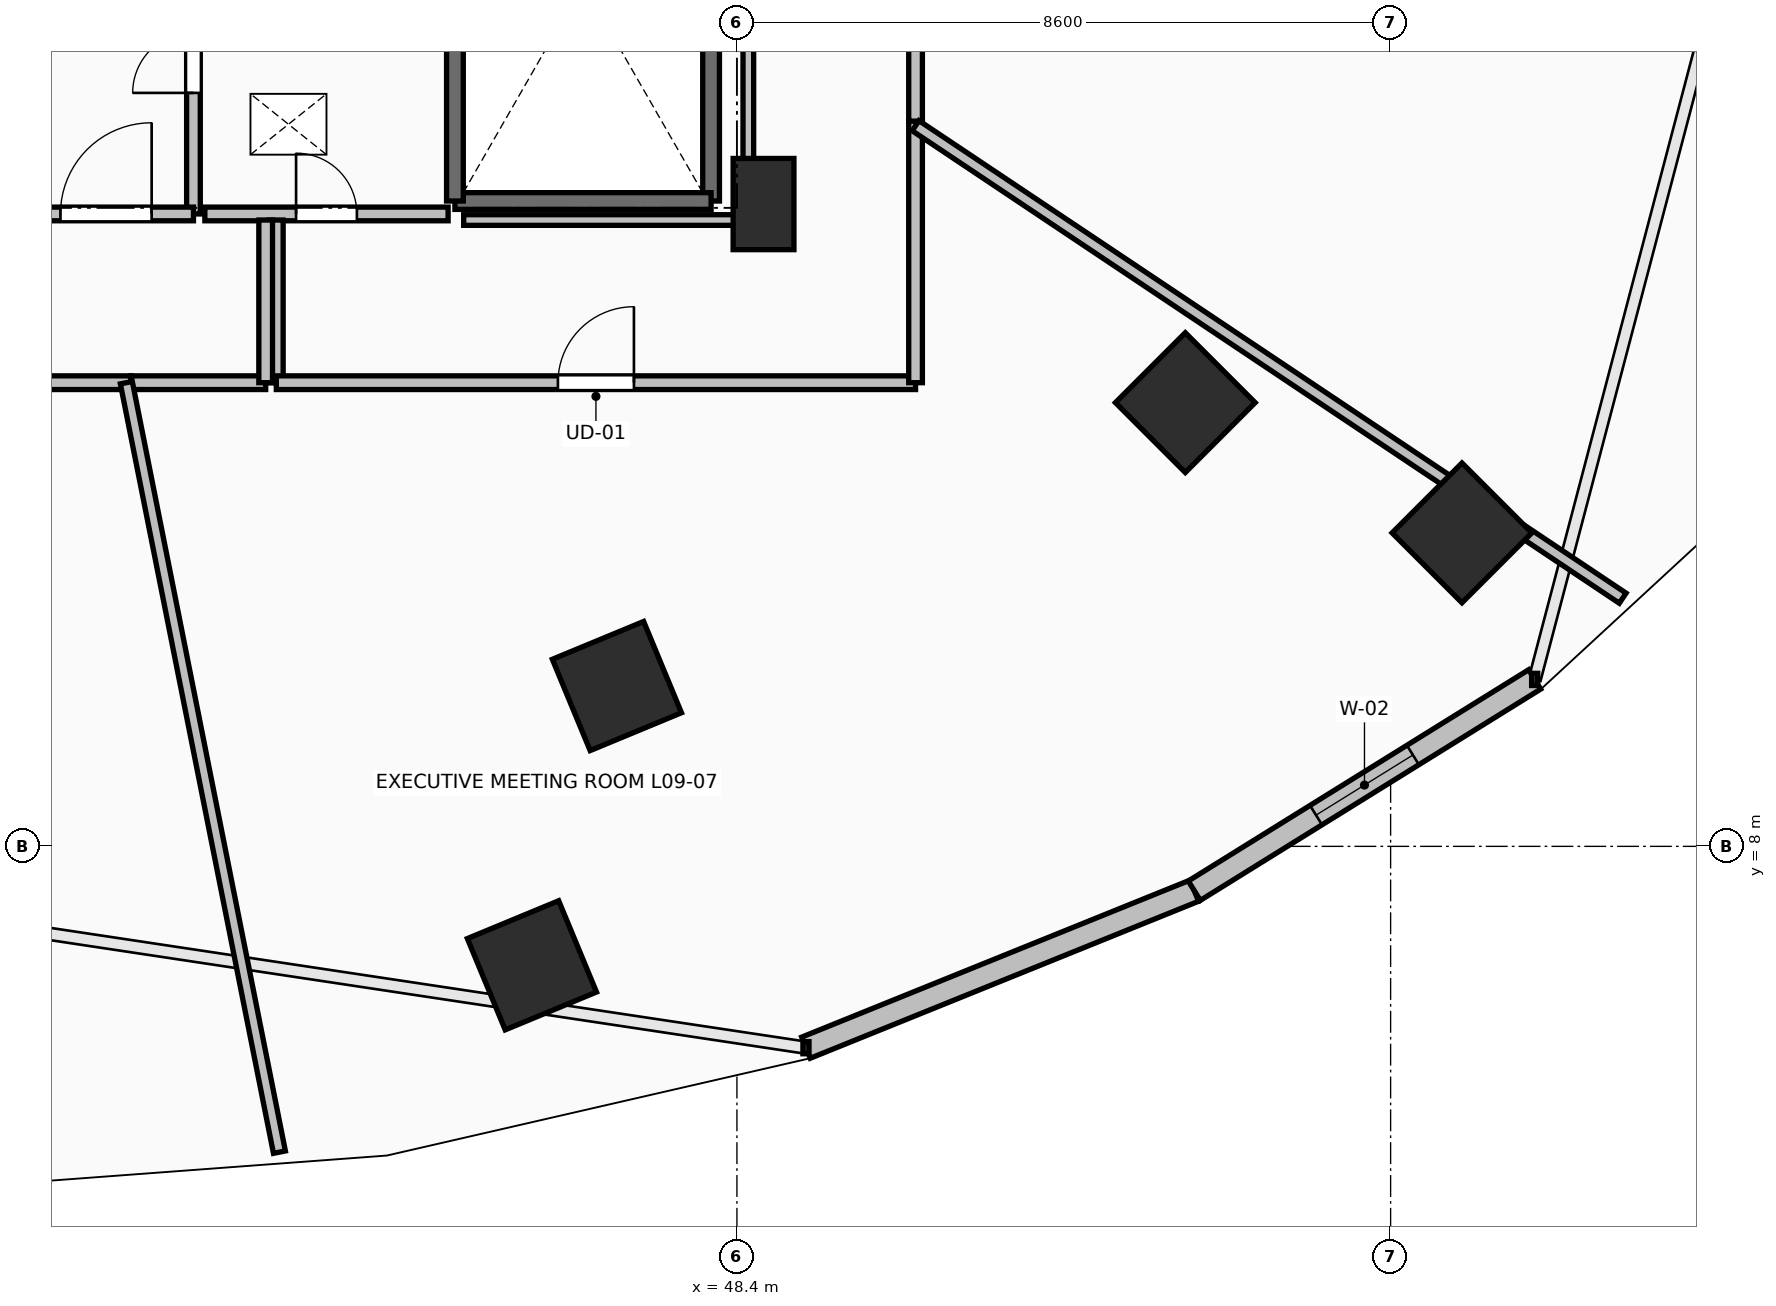
"""IFC4 building model, lengths in metres.
Left out: names, types, materials, properties, quantities, classifications, styles, units other than length and angle.
Written with IfcOpenShell. Run it as: python <this file> out.ifc"""

import sys

from ifc_helpers import new_model, si_unit, direction, frame, frame_2d, origin, origin_2d, place, context, subcontext, project, spatial, rectangle, extrude, element, fill, save


model = new_model("IFC4")
c1 = context("Model", 3, precision=1e-05, world=origin(), true_north=direction((0.0, 1.0)))
c2 = subcontext(c1, "Body", "Model", "MODEL_VIEW")
j1 = project(units=[si_unit("LENGTHUNIT", "METRE"), si_unit("PLANEANGLEUNIT", "RADIAN")], contexts=[c1])
p1 = place(None, origin())
s1 = spatial("IfcSite", under=j1, at=p1, CompositionType="ELEMENT")
p2 = place(p1, origin())
s2 = spatial("IfcBuilding", under=s1, at=p2, CompositionType="ELEMENT")
p3 = place(p2, frame((0.0, 0.0, 38.0)))
s3 = spatial("IfcBuildingStorey", under=s2, at=p3, CompositionType="ELEMENT", Elevation=38.0)
for number, where, z_axis, x_axis in (
    (1, (46.821, 10.109, 0.0), (0.0, 0.0, 1.0), (0.383, -0.924, 0.0)),
    (2, (54.299, 13.838, 0.0), (0.0, 0.0, 1.0), (0.707, -0.707, 0.0)),
    (3, (45.703, 6.435, 0.0), (0.0, 0.0, 1.0), (0.383, -0.924, 0.0)),
    (4, (57.939, 12.124, 0.0), (0.0, 0.0, 1.0), (0.707, -0.707, 0.0)),
):
    element("IfcColumn", number, at=place(p3, frame(where, z_axis=z_axis, x_axis=x_axis)), inside=s3, PredefinedType="COLUMN", context=c2, shape_type="SweptSolid", body=[
        extrude(rectangle(XDim=1.3, YDim=1.3, at=origin_2d()), origin(), (0.0, 0.0, 1.0), 3.5),
    ])
p4 = place(p3, frame((48.75, 16.45, 0.0), z_axis=(0.0, 0.0, 1.0), x_axis=(1.0, 0.0, 0.0)))
e5 = element("IfcColumn", 5, at=p4, inside=s3, PredefinedType="PILASTER", context=c2, shape_type="SweptSolid", body=[
    extrude(rectangle(XDim=0.8, YDim=1.2, at=origin_2d()), origin(), (0.0, 0.0, 1.0), 3.5),
])
p5 = place(p3, frame((49.308, 5.351, 0.0), z_axis=(0.0, 0.0, 1.0), x_axis=(0.927095325176, 0.374825636845, 0.0)))
e6 = element("IfcWall", 6, at=p5, inside=s3, PredefinedType="STANDARD", context=c2, shape_type="SweptSolid", body=[
    extrude(rectangle(XDim=5.51, YDim=0.3, at=frame_2d((2.755, 0.0))), origin(), (0.0, 0.0, 1.0), 3.24),
])
p6 = place(p3, frame((54.417, 7.417, 0.0), z_axis=(0.0, 0.0, 1.0), x_axis=(0.849633724826, 0.527373239404, 0.0)))
e7 = element("IfcWall", 7, at=p6, inside=s3, PredefinedType="STANDARD", context=c2, shape_type="SweptSolid", body=[
    extrude(rectangle(XDim=5.271, YDim=0.3, at=frame_2d((2.635, 0.0))), origin(), (0.0, 0.0, 1.0), 3.24),
])
p7 = place(p6, frame((1.885, 0.0, 0.85)))
e8 = element("IfcOpeningElement", 8, at=p7, cuts=e7, PredefinedType="OPENING", context=c2, shape_type="SweptSolid", body=[
    extrude(rectangle(XDim=1.5, YDim=2.19, at=frame_2d((0.75, 1.095))), frame((0.0, 0.165, 0.0), z_axis=(0.0, -1.0, 0.0), x_axis=(1.0, 0.0, 0.0)), (0.0, 0.0, 1.0), 0.33),
])
p8 = place(p3, frame((48.06, 23.91, 0.0), z_axis=(0.0, 0.0, 1.0), x_axis=(0.0, -1.0, 0.0)))
e9 = element("IfcWall", 9, at=p8, inside=s3, PredefinedType="SOLIDWALL", context=c2, shape_type="SweptSolid", body=[
    extrude(rectangle(XDim=7.42, YDim=0.22, at=frame_2d((3.71, 0.0))), origin(), (0.0, 0.0, 1.0), 3.24),
])
p9 = place(p3, frame((48.06, 16.49, 0.0), z_axis=(0.0, 0.0, 1.0), x_axis=(-1.0, 0.0, 0.0)))
e10 = element("IfcWall", 10, at=p9, inside=s3, PredefinedType="SOLIDWALL", context=c2, shape_type="SweptSolid", body=[
    extrude(rectangle(XDim=3.37, YDim=0.22, at=frame_2d((1.685, 0.0))), origin(), (0.0, 0.0, 1.0), 3.24),
])
p10 = place(p3, frame((44.69, 16.49, 0.0), z_axis=(0.0, 0.0, 1.0), x_axis=(0.0, 1.0, 0.0)))
e11 = element("IfcWall", 11, at=p10, inside=s3, PredefinedType="SOLIDWALL", context=c2, shape_type="SweptSolid", body=[
    extrude(rectangle(XDim=7.42, YDim=0.22, at=frame_2d((3.71, 0.0))), origin(), (0.0, 0.0, 1.0), 3.24),
])
p11 = place(p3, frame((41.25, 16.32, 0.0), z_axis=(0.0, 0.0, 1.0), x_axis=(0.0, 1.0, 0.0)))
e12 = element("IfcWall", 12, at=p11, inside=s3, PredefinedType="PARTITIONING", context=c2, shape_type="SweptSolid", body=[
    extrude(rectangle(XDim=3.985, YDim=0.18, at=frame_2d((1.992, 0.0))), origin(), (0.0, 0.0, 1.0), 3.24),
])
p12 = place(p11, frame((1.593, 0.0, 0.0)))
e13 = element("IfcOpeningElement", 13, at=p12, cuts=e12, PredefinedType="OPENING", context=c2, shape_type="SweptSolid", body=[
    extrude(rectangle(XDim=0.8, YDim=2.05, at=frame_2d((0.4, 1.025))), frame((0.0, 0.105, 0.0), z_axis=(0.0, -1.0, 0.0), x_axis=(1.0, 0.0, 0.0)), (0.0, 0.0, 1.0), 0.21),
])
p13 = place(p3, frame((38.95, 16.32, 0.0), z_axis=(0.0, 0.0, 1.0), x_axis=(1.0, 0.0, 0.0)))
e14 = element("IfcWall", 14, at=p13, inside=s3, PredefinedType="PARTITIONING", context=c2, shape_type="SweptSolid", body=[
    extrude(rectangle(XDim=2.3, YDim=0.18, at=frame_2d((1.15, 0.0))), origin(), (0.0, 0.0, 1.0), 3.24),
])
p14 = place(p13, frame((0.55, 0.0, 0.0)))
e15 = element("IfcOpeningElement", 15, at=p14, cuts=e14, PredefinedType="OPENING", context=c2, shape_type="SweptSolid", body=[
    extrude(rectangle(XDim=1.2, YDim=2.15, at=frame_2d((0.6, 1.075))), frame((0.0, 0.105, 0.0), z_axis=(0.0, -1.0, 0.0), x_axis=(1.0, 0.0, 0.0)), (0.0, 0.0, 1.0), 0.21),
])
p15 = place(p3, frame((41.4, 16.32, 0.0), z_axis=(0.0, 0.0, 1.0), x_axis=(1.0, 0.0, 0.0)))
e16 = element("IfcWall", 16, at=p15, inside=s3, PredefinedType="PARTITIONING", context=c2, shape_type="SweptSolid", body=[
    extrude(rectangle(XDim=3.2, YDim=0.18, at=frame_2d((1.6, 0.0))), origin(), (0.0, 0.0, 1.0), 3.24),
])
p16 = place(p15, frame((1.2, 0.0, 0.0)))
e17 = element("IfcOpeningElement", 17, at=p16, cuts=e16, PredefinedType="OPENING", context=c2, shape_type="SweptSolid", body=[
    extrude(rectangle(XDim=0.8, YDim=2.05, at=frame_2d((0.4, 1.025))), frame((0.0, 0.105, 0.0), z_axis=(0.0, -1.0, 0.0), x_axis=(1.0, 0.0, 0.0)), (0.0, 0.0, 1.0), 0.21),
])
p17 = place(p3, frame((30.109, 14.1, 0.0), z_axis=(0.0, 0.0, 1.0), x_axis=(1.0, 0.0, 0.0)))
e18 = element("IfcWall", 18, at=p17, inside=s3, PredefinedType="PARTITIONING", context=c2, shape_type="SweptSolid", body=[
    extrude(rectangle(XDim=10.319, YDim=0.18, at=frame_2d((5.16, 0.0))), origin(), (0.0, 0.0, 1.0), 3.24),
])
p18 = place(p17, frame((4.659, 0.0, 0.0)))
e19 = element("IfcOpeningElement", 19, at=p18, cuts=e18, PredefinedType="OPENING", context=c2, shape_type="SweptSolid", body=[
    extrude(rectangle(XDim=1.0, YDim=2.15, at=frame_2d((0.5, 1.075))), frame((0.0, 0.105, 0.0), z_axis=(0.0, -1.0, 0.0), x_axis=(1.0, 0.0, 0.0)), (0.0, 0.0, 1.0), 0.21),
])
p19 = place(p3, frame((42.34, 16.24, 0.0), z_axis=(0.0, 0.0, 1.0), x_axis=(0.0, -1.0, 0.0)))
e20 = element("IfcWall", 20, at=p19, inside=s3, PredefinedType="PARTITIONING", context=c2, shape_type="SweptSolid", body=[
    extrude(rectangle(XDim=2.14, YDim=0.18, at=frame_2d((1.07, 0.0))), origin(), (0.0, 0.0, 1.0), 3.24),
])
p20 = place(p3, frame((42.34, 14.1, 0.0), z_axis=(0.0, 0.0, 1.0), x_axis=(1.0, 0.0, 0.0)))
e21 = element("IfcWall", 21, at=p20, inside=s3, PredefinedType="PARTITIONING", context=c2, shape_type="SweptSolid", body=[
    extrude(rectangle(XDim=8.41, YDim=0.18, at=frame_2d((4.205, 0.0))), origin(), (0.0, 0.0, 1.0), 2.432),
])
p21 = place(p20, frame((3.705, 0.0, 0.0)))
e22 = element("IfcOpeningElement", 22, at=p21, cuts=e21, PredefinedType="OPENING", context=c2, shape_type="SweptSolid", body=[
    extrude(rectangle(XDim=1.0, YDim=2.15, at=frame_2d((0.5, 1.075))), frame((0.0, 0.105, 0.0), z_axis=(0.0, -1.0, 0.0), x_axis=(1.0, 0.0, 0.0)), (0.0, 0.0, 1.0), 0.21),
])
p22 = place(p3, frame((50.75, 14.1, 0.0), z_axis=(0.0, 0.0, 1.0), x_axis=(0.0, 1.0, 0.0)))
e23 = element("IfcWall", 23, at=p22, inside=s3, PredefinedType="PARTITIONING", context=c2, shape_type="SweptSolid", body=[
    extrude(rectangle(XDim=3.441, YDim=0.18, at=frame_2d((1.72, 0.0))), origin(), (0.0, 0.0, 1.0), 2.432),
])
p23 = place(p3, frame((40.428, 14.1, 0.0), z_axis=(0.0, 0.0, 1.0), x_axis=(1.0, 0.0, 0.0)))
e24 = element("IfcWall", 24, at=p23, inside=s3, PredefinedType="PARTITIONING", context=c2, shape_type="SweptSolid", body=[
    extrude(rectangle(XDim=1.772, YDim=0.18, at=frame_2d((0.886, 0.0))), origin(), (0.0, 0.0, 1.0), 3.24),
])
p24 = place(p3, frame((42.2, 14.1, 0.0), z_axis=(0.0, 0.0, 1.0), x_axis=(0.0, 1.0, 0.0)))
e25 = element("IfcWall", 25, at=p24, inside=s3, PredefinedType="PARTITIONING", context=c2, shape_type="SweptSolid", body=[
    extrude(rectangle(XDim=2.14, YDim=0.18, at=frame_2d((1.07, 0.0))), origin(), (0.0, 0.0, 1.0), 3.24),
])
p25 = place(p3, frame((50.75, 17.541, 0.0), z_axis=(0.0, 0.0, 1.0), x_axis=(0.0, 1.0, 0.0)))
e26 = element("IfcWall", 26, at=p25, inside=s3, PredefinedType="PARTITIONING", context=c2, shape_type="SweptSolid", body=[
    extrude(rectangle(XDim=10.795, YDim=0.18, at=frame_2d((5.397, 0.0))), origin(), (0.0, 0.0, 1.0), 2.432),
])
p26 = place(p25, frame((4.897, 0.0, 0.0)))
e27 = element("IfcOpeningElement", 27, at=p26, cuts=e26, PredefinedType="OPENING", context=c2, shape_type="SweptSolid", body=[
    extrude(rectangle(XDim=1.0, YDim=2.15, at=frame_2d((0.5, 1.075))), frame((0.0, 0.105, 0.0), z_axis=(0.0, -1.0, 0.0), x_axis=(1.0, 0.0, 0.0)), (0.0, 0.0, 1.0), 0.21),
])
p27 = place(p3, frame((42.381, 3.977, 0.0), z_axis=(0.0, 0.0, 1.0), x_axis=(-0.195142599893, 0.980774880239, 0.0)))
e28 = element("IfcWall", 28, at=p27, inside=s3, PredefinedType="PARTITIONING", context=c2, shape_type="SweptSolid", body=[
    extrude(rectangle(XDim=10.322, YDim=0.16, at=frame_2d((5.161, 0.0))), origin(), (0.0, 0.0, 1.0), 2.432),
])
p28 = place(p3, frame((60.053, 11.265, 0.0), z_axis=(0.0, 0.0, 1.0), x_axis=(-0.831469078055, 0.555571032577, 0.0)))
e29 = element("IfcWall", 29, at=p28, inside=s3, PredefinedType="PARTITIONING", context=c2, shape_type="SweptSolid", body=[
    extrude(rectangle(XDim=11.189, YDim=0.16, at=frame_2d((5.594, 0.0))), origin(), (0.0, 0.0, 1.0), 2.624),
])
p29 = place(p3, frame((48.55, 23.754, 0.0), z_axis=(0.0, 0.0, 1.0), x_axis=(0.0, -1.0, 0.0)))
e30 = element("IfcWall", 30, at=p29, inside=s3, PredefinedType="PARTITIONING", context=c2, shape_type="SweptSolid", body=[
    extrude(rectangle(XDim=7.514, YDim=0.14, at=frame_2d((3.757, 0.0))), origin(), (0.0, 0.0, 1.0), 2.432),
])
p30 = place(p3, frame((48.55, 16.24, 0.0), z_axis=(0.0, 0.0, 1.0), x_axis=(-1.0, 0.0, 0.0)))
e31 = element("IfcWall", 31, at=p30, inside=s3, PredefinedType="PARTITIONING", context=c2, shape_type="SweptSolid", body=[
    extrude(rectangle(XDim=3.745, YDim=0.14, at=frame_2d((1.873, 0.0))), origin(), (0.0, 0.0, 1.0), 2.432),
])
p31 = place(p7, origin())
e32 = element("IfcWindow", 32, at=p31, inside=s3, PartitioningType="SINGLE_PANEL", PredefinedType="WINDOW", context=c2, shape_type="SweptSolid", body=[
    extrude(rectangle(XDim=1.5, YDim=2.19, at=frame_2d((0.75, 1.095))), frame((0.0, 0.03, 0.0), z_axis=(0.0, -1.0, 0.0), x_axis=(1.0, 0.0, 0.0)), (0.0, 0.0, 1.0), 0.06),
])
fill(e8, e32)
p32 = place(p12, origin())
e33 = element("IfcDoor", 33, at=p32, inside=s3, OperationType="SINGLE_SWING_LEFT", PredefinedType="DOOR", context=c2, shape_type="SweptSolid", body=[
    extrude(rectangle(XDim=0.8, YDim=2.05, at=frame_2d((0.4, 1.025))), frame((0.0, 0.025, 0.0), z_axis=(0.0, -1.0, 0.0), x_axis=(1.0, 0.0, 0.0)), (0.0, 0.0, 1.0), 0.05),
])
fill(e13, e33)
p33 = place(p14, origin())
e34 = element("IfcDoor", 34, at=p33, inside=s3, OperationType="SINGLE_SWING_RIGHT", PredefinedType="DOOR", context=c2, shape_type="SweptSolid", body=[
    extrude(rectangle(XDim=1.2, YDim=2.15, at=frame_2d((0.6, 1.075))), frame((0.0, 0.025, 0.0), z_axis=(0.0, -1.0, 0.0), x_axis=(1.0, 0.0, 0.0)), (0.0, 0.0, 1.0), 0.05),
])
fill(e15, e34)
p34 = place(p16, origin())
e35 = element("IfcDoor", 35, at=p34, inside=s3, OperationType="SINGLE_SWING_LEFT", PredefinedType="DOOR", context=c2, shape_type="SweptSolid", body=[
    extrude(rectangle(XDim=0.8, YDim=2.05, at=frame_2d((0.4, 1.025))), frame((0.0, 0.025, 0.0), z_axis=(0.0, -1.0, 0.0), x_axis=(1.0, 0.0, 0.0)), (0.0, 0.0, 1.0), 0.05),
])
fill(e17, e35)
p35 = place(p21, origin())
e36 = element("IfcDoor", 36, at=p35, inside=s3, OperationType="SINGLE_SWING_RIGHT", PredefinedType="DOOR", context=c2, shape_type="SweptSolid", body=[
    extrude(rectangle(XDim=1.0, YDim=2.15, at=frame_2d((0.5, 1.075))), frame((0.0, 0.025, 0.0), z_axis=(0.0, -1.0, 0.0), x_axis=(1.0, 0.0, 0.0)), (0.0, 0.0, 1.0), 0.05),
])
fill(e22, e36)
save(model, sys.argv[1])
